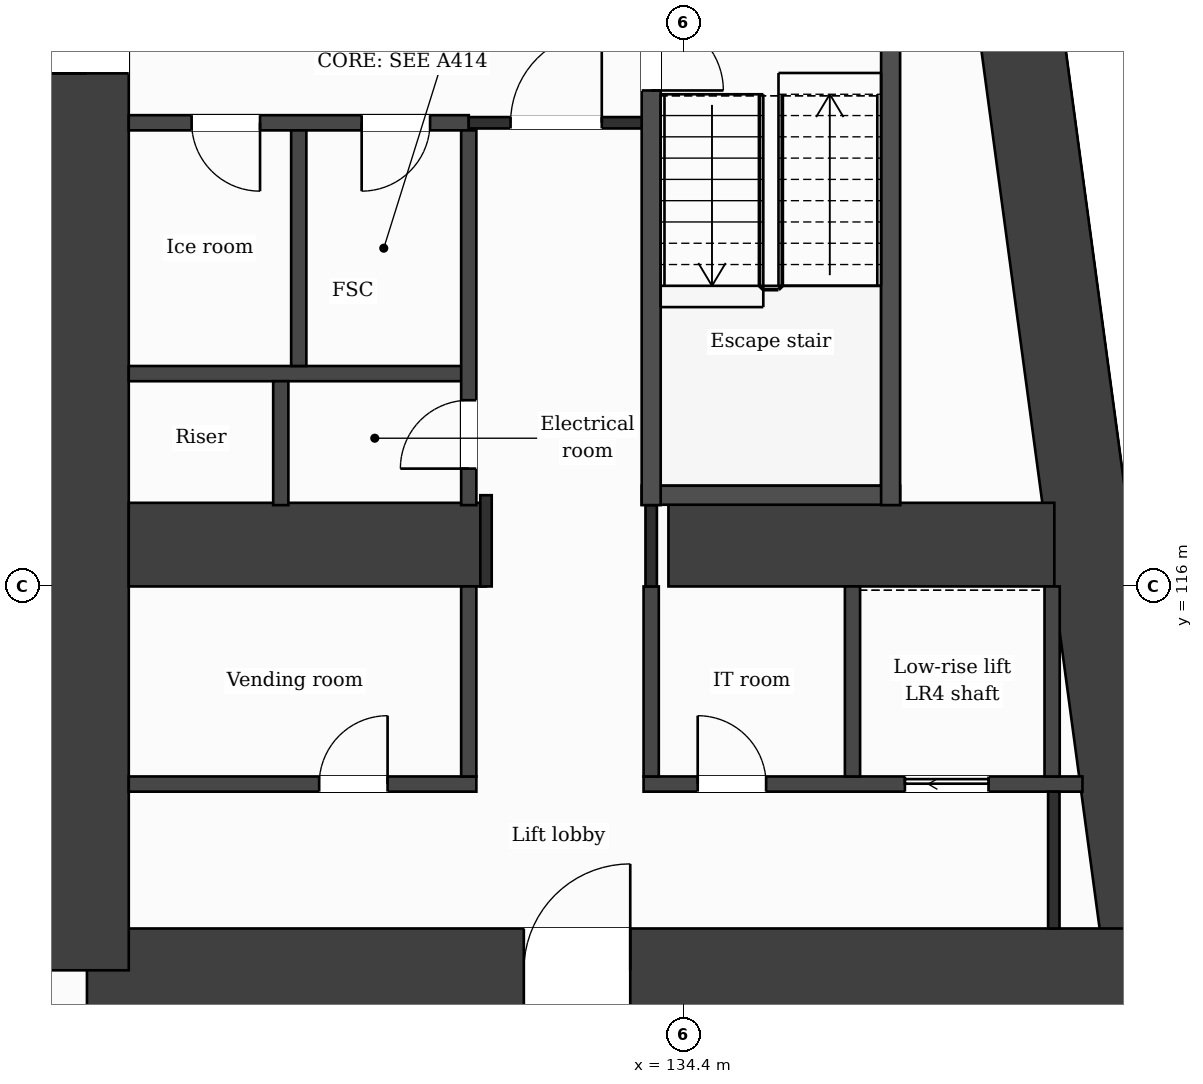
"""IFC4 building model, lengths in metres.
Left out: names, types, materials, properties, quantities, classifications, styles, units other than length and angle.
Written with IfcOpenShell. Run it as: python <this file> out.ifc"""

import sys

from ifc_helpers import new_model, si_unit, direction, frame, frame_2d, origin, place, context, subcontext, project, spatial, rectangle, extrude, element, fill, save


model = new_model("IFC4")
c1 = context("Model", 3, precision=1e-05, world=origin(), true_north=direction((0.0, 1.0)))
c2 = subcontext(c1, "Body", "Model", "MODEL_VIEW")
j1 = project(units=[si_unit("LENGTHUNIT", "METRE"), si_unit("PLANEANGLEUNIT", "RADIAN")], contexts=[c1])
p1 = place(None, origin())
s1 = spatial("IfcSite", under=j1, at=p1, CompositionType="ELEMENT")
p2 = place(p1, origin())
s2 = spatial("IfcBuilding", under=s1, at=p2, CompositionType="ELEMENT")
p3 = place(p2, frame((0.0, 0.0, 63.5)))
s3 = spatial("IfcBuildingStorey", under=s2, at=p3, CompositionType="ELEMENT", Elevation=63.5)
p4 = place(p3, frame((137.688, 131.85, 0.0), z_axis=(0.0, 0.0, 1.0), x_axis=(0.133411793472, -0.991060691059, 0.0)))
e1 = element("IfcWall", 1, at=p4, inside=s3, PredefinedType="SHEAR", context=c2, shape_type="SweptSolid", body=[
    extrude(rectangle(XDim=21.089, YDim=1.1, at=frame_2d((10.544, 0.0))), origin(), (0.0, 0.0, 1.0), 3.5),
])
p5 = place(p3, frame((140.502, 110.95, 0.0), z_axis=(0.0, 0.0, 1.0), x_axis=(-1.0, 0.0, 0.0)))
e2 = element("IfcWall", 2, at=p5, inside=s3, PredefinedType="SHEAR", context=c2, shape_type="SweptSolid", body=[
    extrude(rectangle(XDim=13.952, YDim=1.1, at=frame_2d((6.976, 0.0))), origin(), (0.0, 0.0, 1.0), 3.5),
])
p6 = place(p5, frame((6.804, 0.0, 0.0)))
e3 = element("IfcOpeningElement", 3, at=p6, cuts=e2, PredefinedType="OPENING", context=c2, shape_type="SweptSolid", body=[
    extrude(rectangle(XDim=1.4, YDim=2.1, at=frame_2d((0.7, 1.05))), frame((0.0, 0.56, 0.0), z_axis=(0.0, -1.0, 0.0), x_axis=(1.0, 0.0, 0.0)), (0.0, 0.0, 1.0), 1.12),
])
p7 = place(p3, frame((126.55, 110.95, 0.0), z_axis=(0.0, 0.0, 1.0), x_axis=(0.0, 1.0, 0.0)))
e4 = element("IfcWall", 4, at=p7, inside=s3, PredefinedType="SHEAR", context=c2, shape_type="SweptSolid", body=[
    extrude(rectangle(XDim=20.9, YDim=1.1, at=frame_2d((10.45, 0.0))), origin(), (0.0, 0.0, 1.0), 3.5),
])
p8 = place(p7, frame((11.8, 0.0, 0.0)))
e5 = element("IfcOpeningElement", 5, at=p8, cuts=e4, PredefinedType="OPENING", context=c2, shape_type="SweptSolid", body=[
    extrude(rectangle(XDim=1.4, YDim=2.1, at=frame_2d((0.7, 1.05))), frame((0.0, 0.56, 0.0), z_axis=(0.0, -1.0, 0.0), x_axis=(1.0, 0.0, 0.0)), (0.0, 0.0, 1.0), 1.12),
])
p9 = place(p3, frame((127.1, 116.55, 0.0), z_axis=(0.0, 0.0, 1.0), x_axis=(1.0, 0.0, 0.0)))
e6 = element("IfcWall", 6, at=p9, inside=s3, PredefinedType="SHEAR", context=c2, shape_type="SweptSolid", body=[
    extrude(rectangle(XDim=4.7, YDim=1.1, at=frame_2d((2.35, 0.0))), origin(), (0.0, 0.0, 1.0), 3.5),
])
p10 = place(p3, frame((134.2, 116.55, 0.0), z_axis=(0.0, 0.0, 1.0), x_axis=(1.0, 0.0, 0.0)))
e7 = element("IfcWall", 7, at=p10, inside=s3, PredefinedType="SHEAR", context=c2, shape_type="SweptSolid", body=[
    extrude(rectangle(XDim=5.077, YDim=1.1, at=frame_2d((2.539, 0.0))), origin(), (0.0, 0.0, 1.0), 3.5),
])
p11 = place(p3, frame((127.1, 113.4, 0.0), z_axis=(0.0, 0.0, 1.0), x_axis=(1.0, 0.0, 0.0)))
e8 = element("IfcWall", 8, at=p11, inside=s3, PredefinedType="PARTITIONING", context=c2, shape_type="SweptSolid", body=[
    extrude(rectangle(XDim=4.573, YDim=0.2, at=frame_2d((2.287, 0.0))), origin(), (0.0, 0.0, 1.0), 3.18),
])
p12 = place(p11, frame((2.505, 0.0, 0.0)))
e9 = element("IfcOpeningElement", 9, at=p12, cuts=e8, PredefinedType="OPENING", context=c2, shape_type="SweptSolid", body=[
    extrude(rectangle(XDim=0.9, YDim=2.1, at=frame_2d((0.45, 1.05))), frame((0.0, 0.11, 0.0), z_axis=(0.0, -1.0, 0.0), x_axis=(1.0, 0.0, 0.0)), (0.0, 0.0, 1.0), 0.22),
])
p13 = place(p3, frame((133.873, 113.4, 0.0), z_axis=(0.0, 0.0, 1.0), x_axis=(1.0, 0.0, 0.0)))
e10 = element("IfcWall", 10, at=p13, inside=s3, PredefinedType="PARTITIONING", context=c2, shape_type="SweptSolid", body=[
    extrude(rectangle(XDim=5.774, YDim=0.2, at=frame_2d((2.887, 0.0))), origin(), (0.0, 0.0, 1.0), 3.18),
])
p14 = place(p13, frame((3.438, 0.0, 0.0)))
e11 = element("IfcOpeningElement", 11, at=p14, cuts=e10, PredefinedType="OPENING", context=c2, shape_type="SweptSolid", body=[
    extrude(rectangle(XDim=1.1, YDim=2.1, at=frame_2d((0.55, 1.05))), frame((0.0, 0.11, 0.0), z_axis=(0.0, -1.0, 0.0), x_axis=(1.0, 0.0, 0.0)), (0.0, 0.0, 1.0), 0.22),
])
p15 = place(p13, frame((0.712, 0.0, 0.0)))
e12 = element("IfcOpeningElement", 12, at=p15, cuts=e10, PredefinedType="OPENING", context=c2, shape_type="SweptSolid", body=[
    extrude(rectangle(XDim=0.9, YDim=2.1, at=frame_2d((0.45, 1.05))), frame((0.0, 0.11, 0.0), z_axis=(0.0, -1.0, 0.0), x_axis=(1.0, 0.0, 0.0)), (0.0, 0.0, 1.0), 0.22),
])
p16 = place(p3, frame((133.848, 117.2, 0.0), z_axis=(0.0, 0.0, 1.0), x_axis=(1.0, 0.0, 0.0)))
e13 = element("IfcWall", 13, at=p16, inside=s3, PredefinedType="PARTITIONING", context=c2, shape_type="SweptSolid", body=[
    extrude(rectangle(XDim=3.4, YDim=0.25, at=frame_2d((1.7, 0.0))), origin(), (0.0, 0.0, 1.0), 3.18),
])
p17 = place(p3, frame((127.1, 118.8, 0.0), z_axis=(0.0, 0.0, 1.0), x_axis=(1.0, 0.0, 0.0)))
e14 = element("IfcWall", 14, at=p17, inside=s3, PredefinedType="PARTITIONING", context=c2, shape_type="SweptSolid", body=[
    extrude(rectangle(XDim=4.473, YDim=0.2, at=frame_2d((2.236, 0.0))), origin(), (0.0, 0.0, 1.0), 3.18),
])
p18 = place(p3, frame((127.1, 122.1, 0.0), z_axis=(0.0, 0.0, 1.0), x_axis=(1.0, 0.0, 0.0)))
e15 = element("IfcWall", 15, at=p18, inside=s3, PredefinedType="PARTITIONING", context=c2, shape_type="SweptSolid", body=[
    extrude(rectangle(XDim=4.473, YDim=0.2, at=frame_2d((2.236, 0.0))), origin(), (0.0, 0.0, 1.0), 3.18),
])
p19 = place(p18, frame((3.064, 0.0, 0.0)))
e16 = element("IfcOpeningElement", 16, at=p19, cuts=e15, PredefinedType="OPENING", context=c2, shape_type="SweptSolid", body=[
    extrude(rectangle(XDim=0.9, YDim=2.1, at=frame_2d((0.45, 1.05))), frame((0.0, 0.11, 0.0), z_axis=(0.0, -1.0, 0.0), x_axis=(1.0, 0.0, 0.0)), (0.0, 0.0, 1.0), 0.22),
])
p20 = place(p18, frame((0.827, 0.0, 0.0)))
e17 = element("IfcOpeningElement", 17, at=p20, cuts=e15, PredefinedType="OPENING", context=c2, shape_type="SweptSolid", body=[
    extrude(rectangle(XDim=0.9, YDim=2.1, at=frame_2d((0.45, 1.05))), frame((0.0, 0.11, 0.0), z_axis=(0.0, -1.0, 0.0), x_axis=(1.0, 0.0, 0.0)), (0.0, 0.0, 1.0), 0.22),
])
p21 = place(p3, frame((131.573, 122.1, 0.0), z_axis=(0.0, 0.0, 1.0), x_axis=(1.0, 0.0, 0.0)))
e18 = element("IfcWall", 18, at=p21, inside=s3, PredefinedType="PARTITIONING", context=c2, shape_type="SweptSolid", body=[
    extrude(rectangle(XDim=2.4, YDim=0.15, at=frame_2d((1.2, 0.0))), origin(), (0.0, 0.0, 1.0), 3.18),
])
p22 = place(p21, frame((0.55, 0.0, 0.0)))
e19 = element("IfcOpeningElement", 19, at=p22, cuts=e18, PredefinedType="OPENING", context=c2, shape_type="SweptSolid", body=[
    extrude(rectangle(XDim=1.2, YDim=2.1, at=frame_2d((0.6, 1.05))), frame((0.0, 0.085, 0.0), z_axis=(0.0, -1.0, 0.0), x_axis=(1.0, 0.0, 0.0)), (0.0, 0.0, 1.0), 0.17),
])
p23 = place(p3, frame((129.1, 117.07, 0.0), z_axis=(0.0, 0.0, 1.0), x_axis=(0.0, 1.0, 0.0)))
e20 = element("IfcWall", 20, at=p23, inside=s3, PredefinedType="PARTITIONING", context=c2, shape_type="SweptSolid", body=[
    extrude(rectangle(XDim=1.63, YDim=0.2, at=frame_2d((0.815, 0.0))), origin(), (0.0, 0.0, 1.0), 3.18),
])
p24 = place(p3, frame((129.336, 118.9, 0.0), z_axis=(0.0, 0.0, 1.0), x_axis=(0.0, 1.0, 0.0)))
e21 = element("IfcWall", 21, at=p24, inside=s3, PredefinedType="PARTITIONING", context=c2, shape_type="SweptSolid", body=[
    extrude(rectangle(XDim=3.1, YDim=0.2, at=frame_2d((1.55, 0.0))), origin(), (0.0, 0.0, 1.0), 3.18),
])
p25 = place(p3, frame((131.573, 113.5, 0.0), z_axis=(0.0, 0.0, 1.0), x_axis=(0.0, 1.0, 0.0)))
e22 = element("IfcWall", 22, at=p25, inside=s3, PredefinedType="PARTITIONING", context=c2, shape_type="SweptSolid", body=[
    extrude(rectangle(XDim=2.5, YDim=0.2, at=frame_2d((1.25, 0.0))), origin(), (0.0, 0.0, 1.0), 3.18),
])
p26 = place(p3, frame((131.573, 117.07, 0.0), z_axis=(0.0, 0.0, 1.0), x_axis=(0.0, 1.0, 0.0)))
e23 = element("IfcWall", 23, at=p26, inside=s3, PredefinedType="PARTITIONING", context=c2, shape_type="SweptSolid", body=[
    extrude(rectangle(XDim=4.93, YDim=0.2, at=frame_2d((2.465, 0.0))), origin(), (0.0, 0.0, 1.0), 3.18),
])
p27 = place(p26, frame((0.48, 0.0, 0.0)))
e24 = element("IfcOpeningElement", 24, at=p27, cuts=e23, PredefinedType="OPENING", context=c2, shape_type="SweptSolid", body=[
    extrude(rectangle(XDim=0.9, YDim=2.1, at=frame_2d((0.45, 1.05))), frame((0.0, 0.11, 0.0), z_axis=(0.0, -1.0, 0.0), x_axis=(1.0, 0.0, 0.0)), (0.0, 0.0, 1.0), 0.22),
])
p28 = place(p3, frame((131.8, 116.0, 0.0), z_axis=(0.0, 0.0, 1.0), x_axis=(0.0, 1.0, 0.0)))
e25 = element("IfcWall", 25, at=p28, inside=s3, PredefinedType="PARTITIONING", context=c2, shape_type="SweptSolid", body=[
    extrude(rectangle(XDim=1.2, YDim=0.15, at=frame_2d((0.6, 0.0))), origin(), (0.0, 0.0, 1.0), 3.18),
])
p29 = place(p3, frame((133.973, 113.5, 0.0), z_axis=(0.0, 0.0, 1.0), x_axis=(0.0, 1.0, 0.0)))
e26 = element("IfcWall", 26, at=p29, inside=s3, PredefinedType="PARTITIONING", context=c2, shape_type="SweptSolid", body=[
    extrude(rectangle(XDim=2.5, YDim=0.2, at=frame_2d((1.25, 0.0))), origin(), (0.0, 0.0, 1.0), 3.18),
])
p30 = place(p3, frame((133.973, 116.0, 0.0), z_axis=(0.0, 0.0, 1.0), x_axis=(0.0, 1.0, 0.0)))
e27 = element("IfcWall", 27, at=p30, inside=s3, PredefinedType="PARTITIONING", context=c2, shape_type="SweptSolid", body=[
    extrude(rectangle(XDim=1.07, YDim=0.15, at=frame_2d((0.535, 0.0))), origin(), (0.0, 0.0, 1.0), 3.18),
])
p31 = place(p3, frame((133.973, 117.07, 0.0), z_axis=(0.0, 0.0, 1.0), x_axis=(0.0, 1.0, 0.0)))
e28 = element("IfcWall", 28, at=p31, inside=s3, PredefinedType="PARTITIONING", context=c2, shape_type="SweptSolid", body=[
    extrude(rectangle(XDim=6.755, YDim=0.25, at=frame_2d((3.377, 0.0))), origin(), (0.0, 0.0, 1.0), 3.18),
])
p32 = place(p31, frame((5.455, 0.0, 0.0)))
e29 = element("IfcOpeningElement", 29, at=p32, cuts=e28, PredefinedType="OPENING", context=c2, shape_type="SweptSolid", body=[
    extrude(rectangle(XDim=0.95, YDim=2.1, at=frame_2d((0.475, 1.05))), frame((0.0, 0.135, 0.0), z_axis=(0.0, -1.0, 0.0), x_axis=(1.0, 0.0, 0.0)), (0.0, 0.0, 1.0), 0.27),
])
p33 = place(p3, frame((136.622, 113.5, 0.0), z_axis=(0.0, 0.0, 1.0), x_axis=(0.0, 1.0, 0.0)))
e30 = element("IfcWall", 30, at=p33, inside=s3, PredefinedType="PARTITIONING", context=c2, shape_type="SweptSolid", body=[
    extrude(rectangle(XDim=2.5, YDim=0.2, at=frame_2d((1.25, 0.0))), origin(), (0.0, 0.0, 1.0), 3.18),
])
p34 = place(p3, frame((137.123, 117.07, 0.0), z_axis=(0.0, 0.0, 1.0), x_axis=(0.0, 1.0, 0.0)))
e31 = element("IfcWall", 31, at=p34, inside=s3, PredefinedType="PARTITIONING", context=c2, shape_type="SweptSolid", body=[
    extrude(rectangle(XDim=6.755, YDim=0.25, at=frame_2d((3.377, 0.0))), origin(), (0.0, 0.0, 1.0), 3.18),
])
p35 = place(p3, frame((139.248, 113.5, 0.0), z_axis=(0.0, 0.0, 1.0), x_axis=(0.0, 1.0, 0.0)))
e32 = element("IfcWall", 32, at=p35, inside=s3, PredefinedType="PARTITIONING", context=c2, shape_type="SweptSolid", body=[
    extrude(rectangle(XDim=2.5, YDim=0.2, at=frame_2d((1.25, 0.0))), origin(), (0.0, 0.0, 1.0), 3.18),
])
p36 = place(p3, frame((139.27, 111.5, 0.0), z_axis=(0.0, 0.0, 1.0), x_axis=(0.0, 1.0, 0.0)))
e33 = element("IfcWall", 33, at=p36, inside=s3, PredefinedType="PARTITIONING", context=c2, shape_type="SweptSolid", body=[
    extrude(rectangle(XDim=1.8, YDim=0.15, at=frame_2d((0.9, 0.0))), origin(), (0.0, 0.0, 1.0), 3.18),
])
p37 = place(p22, origin())
e34 = element("IfcDoor", 34, at=p37, inside=s3, OperationType="SINGLE_SWING_RIGHT", PredefinedType="DOOR", context=c2, shape_type="SweptSolid", body=[
    extrude(rectangle(XDim=1.2, YDim=2.1, at=frame_2d((0.6, 1.05))), frame((0.0, 0.025, 0.0), z_axis=(0.0, -1.0, 0.0), x_axis=(1.0, 0.0, 0.0)), (0.0, 0.0, 1.0), 0.05),
])
fill(e19, e34)
p38 = place(p19, origin())
e35 = element("IfcDoor", 35, at=p38, inside=s3, OperationType="SINGLE_SWING_LEFT", PredefinedType="DOOR", context=c2, shape_type="SweptSolid", body=[
    extrude(rectangle(XDim=0.9, YDim=2.1, at=frame_2d((0.45, 1.05))), frame((0.0, 0.025, 0.0), z_axis=(0.0, -1.0, 0.0), x_axis=(1.0, 0.0, 0.0)), (0.0, 0.0, 1.0), 0.05),
])
fill(e16, e35)
p39 = place(p20, origin())
e36 = element("IfcDoor", 36, at=p39, inside=s3, OperationType="SINGLE_SWING_RIGHT", PredefinedType="DOOR", context=c2, shape_type="SweptSolid", body=[
    extrude(rectangle(XDim=0.9, YDim=2.1, at=frame_2d((0.45, 1.05))), frame((0.0, 0.025, 0.0), z_axis=(0.0, -1.0, 0.0), x_axis=(1.0, 0.0, 0.0)), (0.0, 0.0, 1.0), 0.05),
])
fill(e17, e36)
p40 = place(p32, origin())
e37 = element("IfcDoor", 37, at=p40, inside=s3, OperationType="SINGLE_SWING_LEFT", PredefinedType="DOOR", context=c2, shape_type="SweptSolid", body=[
    extrude(rectangle(XDim=0.95, YDim=2.1, at=frame_2d((0.475, 1.05))), frame((0.0, 0.025, 0.0), z_axis=(0.0, -1.0, 0.0), x_axis=(1.0, 0.0, 0.0)), (0.0, 0.0, 1.0), 0.05),
])
fill(e29, e37)
p41 = place(p27, origin())
e38 = element("IfcDoor", 38, at=p41, inside=s3, OperationType="SINGLE_SWING_LEFT", PredefinedType="DOOR", context=c2, shape_type="SweptSolid", body=[
    extrude(rectangle(XDim=0.9, YDim=2.1, at=frame_2d((0.45, 1.05))), frame((0.0, 0.025, 0.0), z_axis=(0.0, -1.0, 0.0), x_axis=(1.0, 0.0, 0.0)), (0.0, 0.0, 1.0), 0.05),
])
fill(e24, e38)
p42 = place(p14, origin())
e39 = element("IfcDoor", 39, at=p42, inside=s3, OperationType="SLIDING_TO_LEFT", PredefinedType="DOOR", context=c2, shape_type="SweptSolid", body=[
    extrude(rectangle(XDim=1.1, YDim=2.1, at=frame_2d((0.55, 1.05))), frame((0.0, 0.025, 0.0), z_axis=(0.0, -1.0, 0.0), x_axis=(1.0, 0.0, 0.0)), (0.0, 0.0, 1.0), 0.05),
])
fill(e11, e39)
p43 = place(p15, origin())
e40 = element("IfcDoor", 40, at=p43, inside=s3, OperationType="SINGLE_SWING_LEFT", PredefinedType="DOOR", context=c2, shape_type="SweptSolid", body=[
    extrude(rectangle(XDim=0.9, YDim=2.1, at=frame_2d((0.45, 1.05))), frame((0.0, 0.025, 0.0), z_axis=(0.0, -1.0, 0.0), x_axis=(1.0, 0.0, 0.0)), (0.0, 0.0, 1.0), 0.05),
])
fill(e12, e40)
p44 = place(p12, origin())
e41 = element("IfcDoor", 41, at=p44, inside=s3, OperationType="SINGLE_SWING_RIGHT", PredefinedType="DOOR", context=c2, shape_type="SweptSolid", body=[
    extrude(rectangle(XDim=0.9, YDim=2.1, at=frame_2d((0.45, 1.05))), frame((0.0, 0.025, 0.0), z_axis=(0.0, -1.0, 0.0), x_axis=(1.0, 0.0, 0.0)), (0.0, 0.0, 1.0), 0.05),
])
fill(e9, e41)
p45 = place(p6, origin())
e42 = element("IfcDoor", 42, at=p45, inside=s3, OperationType="SINGLE_SWING_LEFT", PredefinedType="DOOR", context=c2, shape_type="SweptSolid", body=[
    extrude(rectangle(XDim=1.4, YDim=2.1, at=frame_2d((0.7, 1.05))), frame((0.0, 0.025, 0.0), z_axis=(0.0, -1.0, 0.0), x_axis=(1.0, 0.0, 0.0)), (0.0, 0.0, 1.0), 0.05),
])
fill(e3, e42)
p46 = place(p8, origin())
e43 = element("IfcDoor", 43, at=p46, inside=s3, OperationType="SINGLE_SWING_LEFT", PredefinedType="DOOR", context=c2, shape_type="SweptSolid", body=[
    extrude(rectangle(XDim=1.4, YDim=2.1, at=frame_2d((0.7, 1.05))), frame((0.0, 0.025, 0.0), z_axis=(0.0, -1.0, 0.0), x_axis=(1.0, 0.0, 0.0)), (0.0, 0.0, 1.0), 0.05),
])
fill(e5, e43)
save(model, sys.argv[1])
